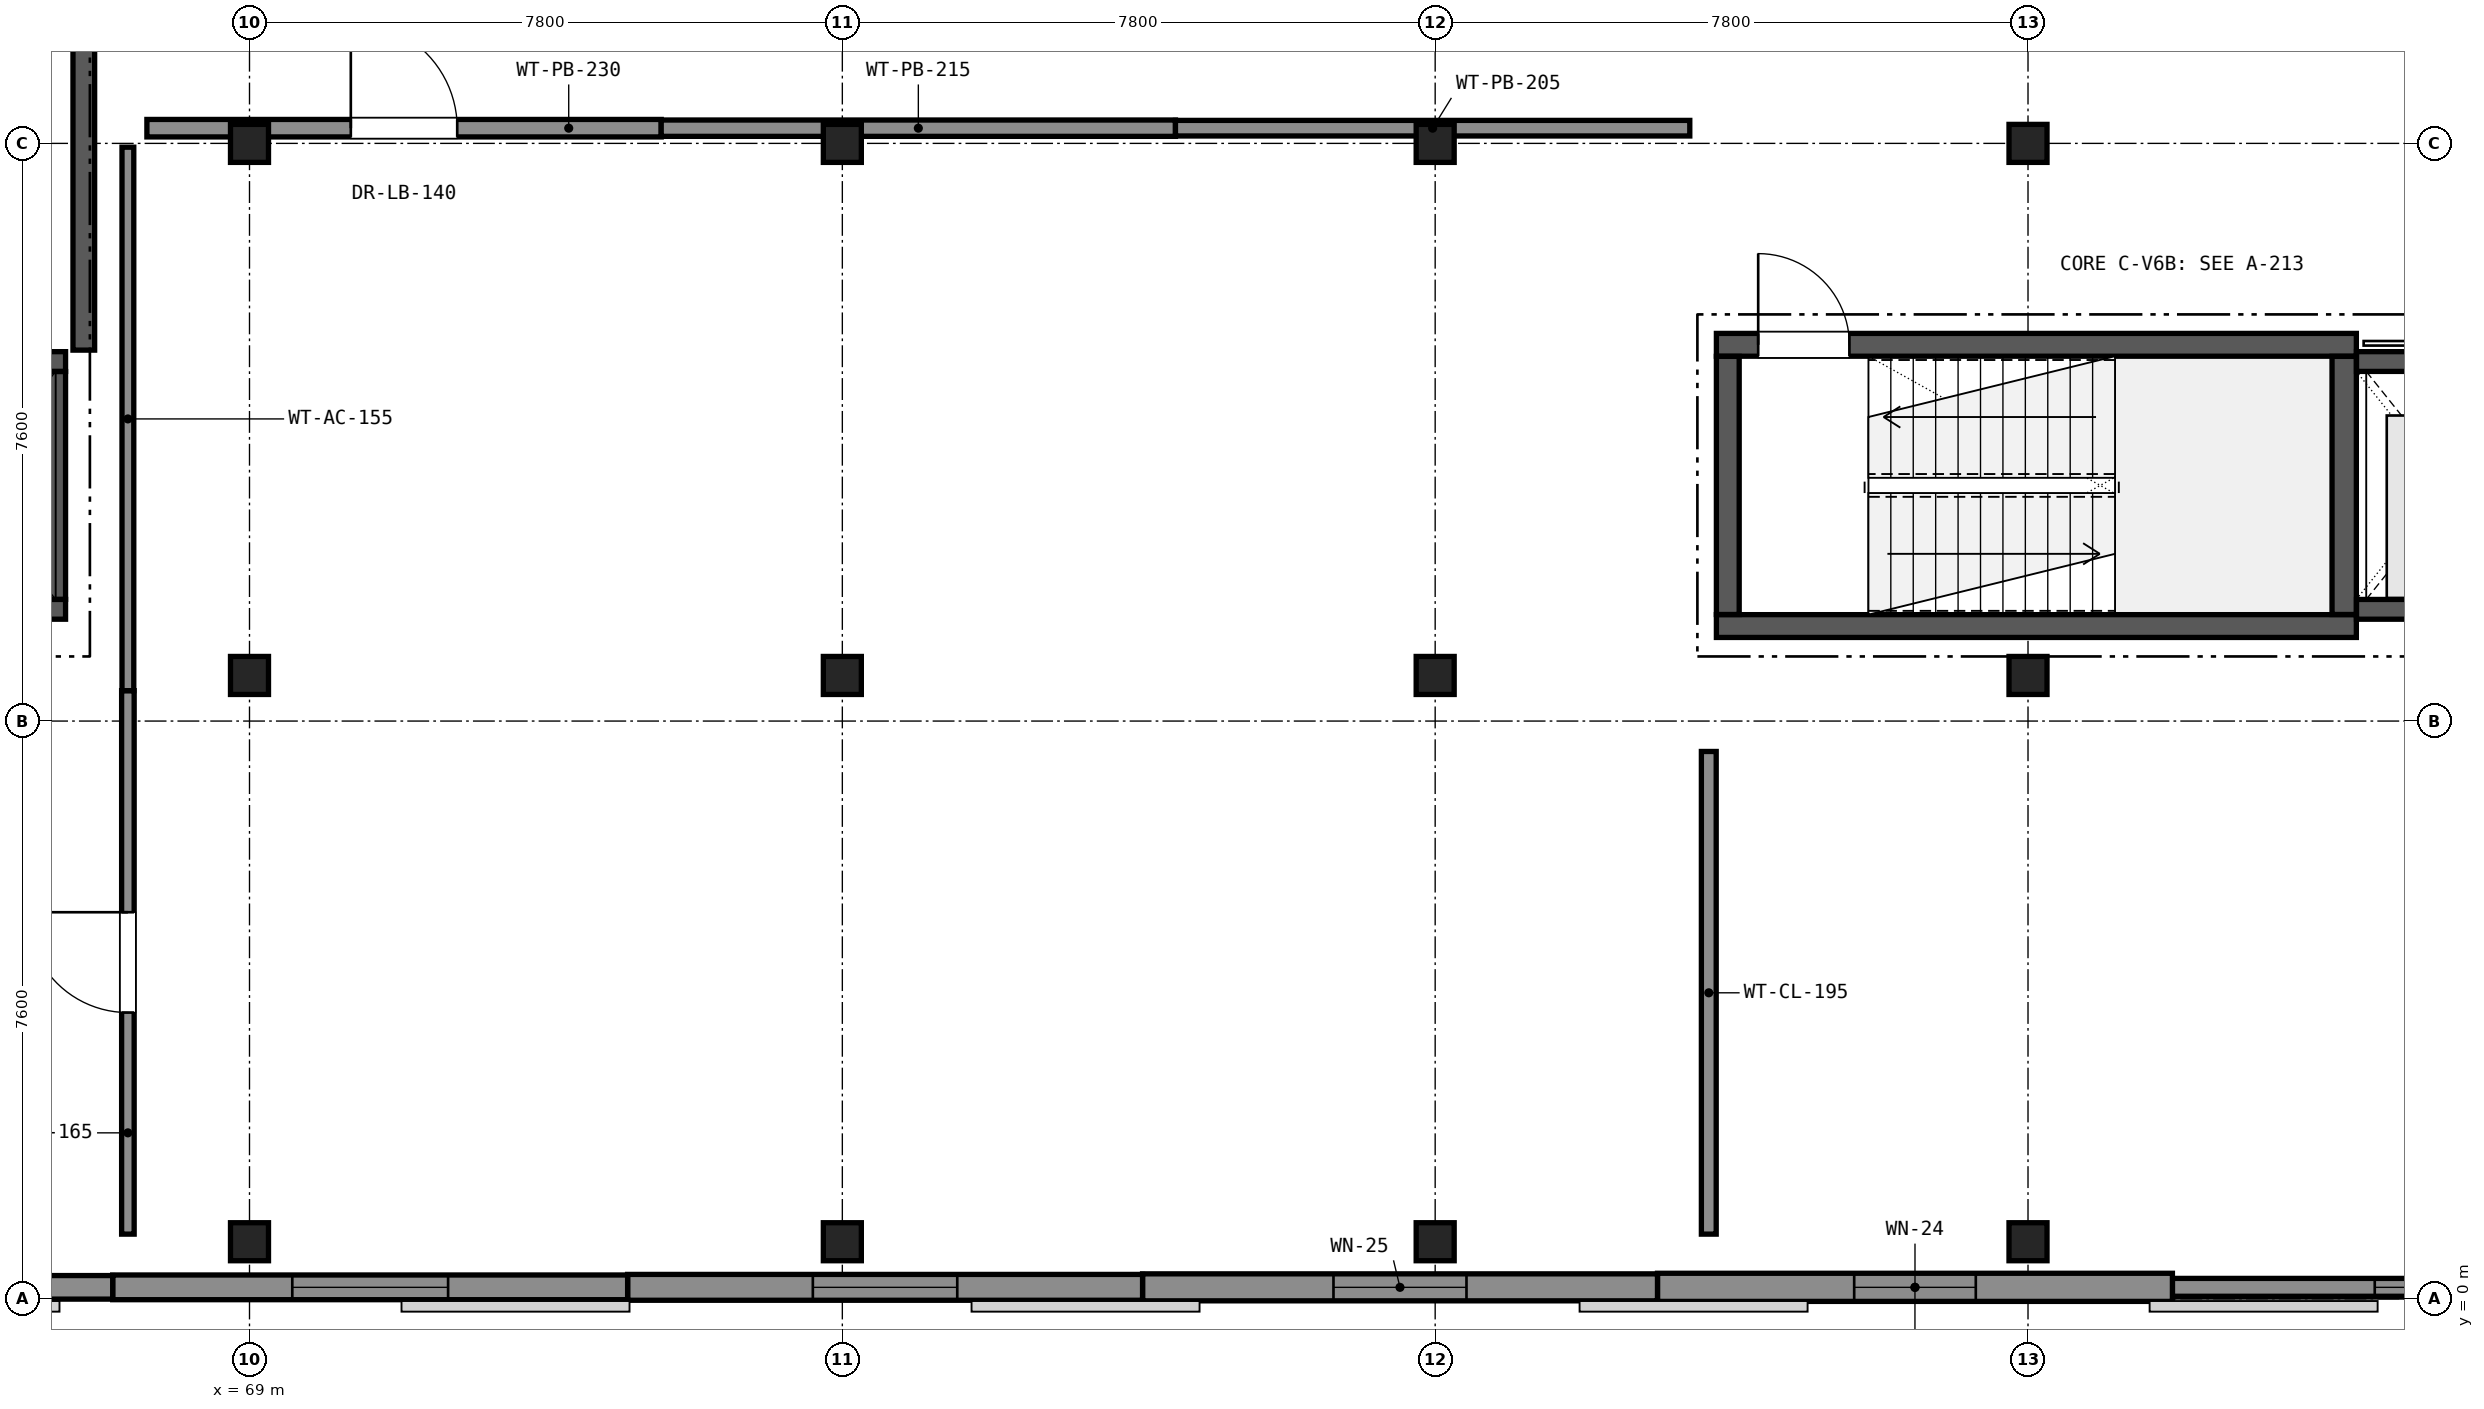
"""IFC4 building model, lengths in metres.
Left out: names, types, materials, properties, quantities, classifications, styles, units other than length and angle.
Written with IfcOpenShell. Run it as: python <this file> out.ifc"""

import sys

from ifc_helpers import new_model, si_unit, direction, frame, frame_2d, origin, origin_2d, place, context, subcontext, project, spatial, rectangle, extrude, element, fill, save


model = new_model("IFC4")
c1 = context("Model", 3, precision=1e-05, world=origin(), true_north=direction((0.0, 1.0)))
c2 = subcontext(c1, "Body", "Model", "MODEL_VIEW")
j1 = project(units=[si_unit("LENGTHUNIT", "METRE"), si_unit("PLANEANGLEUNIT", "RADIAN")], contexts=[c1])
p1 = place(None, origin())
s1 = spatial("IfcSite", under=j1, at=p1, CompositionType="ELEMENT")
p2 = place(p1, origin())
s2 = spatial("IfcBuilding", under=s1, at=p2, CompositionType="ELEMENT")
p3 = place(p2, frame((0.0, 0.0, 13.6)))
s3 = spatial("IfcBuildingStorey", under=s2, at=p3, CompositionType="ELEMENT", Elevation=13.6)
for number, where, z_axis, x_axis in (
    (1, (69.0, 0.75, 0.0), (0.0, 0.0, 1.0), (1.0, 0.0, 0.0)),
    (2, (69.0, 8.2, 0.0), (0.0, 0.0, 1.0), (1.0, 0.0, 0.0)),
    (3, (69.0, 15.2, 0.0), (0.0, 0.0, 1.0), (1.0, 0.0, 0.0)),
    (4, (76.8, 0.75, 0.0), (0.0, 0.0, 1.0), (1.0, 0.0, 0.0)),
    (5, (76.8, 8.2, 0.0), (0.0, 0.0, 1.0), (1.0, 0.0, 0.0)),
    (6, (76.8, 15.2, 0.0), (0.0, 0.0, 1.0), (1.0, 0.0, 0.0)),
    (7, (84.6, 0.75, 0.0), (0.0, 0.0, 1.0), (1.0, 0.0, 0.0)),
    (8, (84.6, 8.2, 0.0), (0.0, 0.0, 1.0), (1.0, 0.0, 0.0)),
    (9, (84.6, 15.2, 0.0), (0.0, 0.0, 1.0), (1.0, 0.0, 0.0)),
    (10, (92.4, 0.75, 0.0), (0.0, 0.0, 1.0), (1.0, 0.0, 0.0)),
    (11, (92.4, 8.2, 0.0), (0.0, 0.0, 1.0), (1.0, 0.0, 0.0)),
    (12, (92.4, 15.2, 0.0), (0.0, 0.0, 1.0), (1.0, 0.0, 0.0)),
):
    element("IfcColumn", number, at=place(p3, frame(where, z_axis=z_axis, x_axis=x_axis)), inside=s3, PredefinedType="COLUMN", context=c2, shape_type="SweptSolid", body=[
        extrude(rectangle(XDim=0.5, YDim=0.5, at=origin_2d()), origin(), (0.0, 0.0, 1.0), 4.08),
    ])
p4 = place(p3, frame((101.075, 0.15, 0.0), z_axis=(0.0, 0.0, 1.0), x_axis=(-1.0, 0.0, 0.0)))
e13 = element("IfcWall", 13, at=p4, inside=s3, PredefinedType="SOLIDWALL", context=c2, shape_type="SweptSolid", body=[
    extrude(rectangle(XDim=6.775, YDim=0.235, at=frame_2d((3.387, 0.0))), origin(), (0.0, 0.0, 1.0), 3.78),
])
p5 = place(p4, frame((2.663, 0.0, 0.9)))
e14 = element("IfcOpeningElement", 14, at=p5, cuts=e13, PredefinedType="OPENING", context=c2, shape_type="SweptSolid", body=[
    extrude(rectangle(XDim=1.45, YDim=2.0, at=frame_2d((0.725, 1.0))), frame((0.0, 0.127, 0.0), z_axis=(0.0, -1.0, 0.0), x_axis=(1.0, 0.0, 0.0)), (0.0, 0.0, 1.0), 0.255),
])
p6 = place(p3, frame((94.3, 0.15, 0.0), z_axis=(0.0, 0.0, 1.0), x_axis=(-1.0, 0.0, 0.0)))
e15 = element("IfcWall", 15, at=p6, inside=s3, PredefinedType="SOLIDWALL", context=c2, shape_type="SweptSolid", body=[
    extrude(rectangle(XDim=6.775, YDim=0.37, at=frame_2d((3.388, 0.0))), origin(), (0.0, 0.0, 1.0), 3.78),
])
p7 = place(p6, frame((2.587, 0.0, 0.9)))
e16 = element("IfcOpeningElement", 16, at=p7, cuts=e15, PredefinedType="OPENING", context=c2, shape_type="SweptSolid", body=[
    extrude(rectangle(XDim=1.6, YDim=2.0, at=frame_2d((0.8, 1.0))), frame((0.0, 0.195, 0.0), z_axis=(0.0, -1.0, 0.0), x_axis=(1.0, 0.0, 0.0)), (0.0, 0.0, 1.0), 0.39),
])
p8 = place(p3, frame((87.525, 0.15, 0.0), z_axis=(0.0, 0.0, 1.0), x_axis=(-1.0, 0.0, 0.0)))
e17 = element("IfcWall", 17, at=p8, inside=s3, PredefinedType="SOLIDWALL", context=c2, shape_type="SweptSolid", body=[
    extrude(rectangle(XDim=6.775, YDim=0.355, at=frame_2d((3.387, 0.0))), origin(), (0.0, 0.0, 1.0), 3.78),
])
p9 = place(p8, frame((2.513, 0.0, 0.9)))
e18 = element("IfcOpeningElement", 18, at=p9, cuts=e17, PredefinedType="OPENING", context=c2, shape_type="SweptSolid", body=[
    extrude(rectangle(XDim=1.75, YDim=2.0, at=frame_2d((0.875, 1.0))), frame((0.0, 0.188, 0.0), z_axis=(0.0, -1.0, 0.0), x_axis=(1.0, 0.0, 0.0)), (0.0, 0.0, 1.0), 0.375),
])
p10 = place(p3, frame((80.75, 0.15, 0.0), z_axis=(0.0, 0.0, 1.0), x_axis=(-1.0, 0.0, 0.0)))
e19 = element("IfcWall", 19, at=p10, inside=s3, PredefinedType="SOLIDWALL", context=c2, shape_type="SweptSolid", body=[
    extrude(rectangle(XDim=6.775, YDim=0.34, at=frame_2d((3.387, 0.0))), origin(), (0.0, 0.0, 1.0), 3.78),
])
p11 = place(p10, frame((2.438, 0.0, 0.9)))
e20 = element("IfcOpeningElement", 20, at=p11, cuts=e19, PredefinedType="OPENING", context=c2, shape_type="SweptSolid", body=[
    extrude(rectangle(XDim=1.9, YDim=2.0, at=frame_2d((0.95, 1.0))), frame((0.0, 0.18, 0.0), z_axis=(0.0, -1.0, 0.0), x_axis=(1.0, 0.0, 0.0)), (0.0, 0.0, 1.0), 0.36),
])
p12 = place(p3, frame((73.975, 0.15, 0.0), z_axis=(0.0, 0.0, 1.0), x_axis=(-1.0, 0.0, 0.0)))
e21 = element("IfcWall", 21, at=p12, inside=s3, PredefinedType="SOLIDWALL", context=c2, shape_type="SweptSolid", body=[
    extrude(rectangle(XDim=6.775, YDim=0.325, at=frame_2d((3.388, 0.0))), origin(), (0.0, 0.0, 1.0), 3.78),
])
p13 = place(p12, frame((2.362, 0.0, 0.9)))
e22 = element("IfcOpeningElement", 22, at=p13, cuts=e21, PredefinedType="OPENING", context=c2, shape_type="SweptSolid", body=[
    extrude(rectangle(XDim=2.05, YDim=2.0, at=frame_2d((1.025, 1.0))), frame((0.0, 0.172, 0.0), z_axis=(0.0, -1.0, 0.0), x_axis=(1.0, 0.0, 0.0)), (0.0, 0.0, 1.0), 0.345),
])
p14 = place(p3, frame((67.2, 0.15, 0.0), z_axis=(0.0, 0.0, 1.0), x_axis=(-1.0, 0.0, 0.0)))
e23 = element("IfcWall", 23, at=p14, inside=s3, PredefinedType="SOLIDWALL", context=c2, shape_type="SweptSolid", body=[
    extrude(rectangle(XDim=6.775, YDim=0.31, at=frame_2d((3.387, 0.0))), origin(), (0.0, 0.0, 1.0), 3.78),
])
p15 = place(p14, frame((2.238, 0.0, 0.9)))
e24 = element("IfcOpeningElement", 24, at=p15, cuts=e23, PredefinedType="OPENING", context=c2, shape_type="SweptSolid", body=[
    extrude(rectangle(XDim=2.3, YDim=2.0, at=frame_2d((1.15, 1.0))), frame((0.0, 0.165, 0.0), z_axis=(0.0, -1.0, 0.0), x_axis=(1.0, 0.0, 0.0)), (0.0, 0.0, 1.0), 0.33),
])
p16 = place(p3, frame((63.922, 9.07, 0.0), z_axis=(0.0, 0.0, 1.0), x_axis=(1.0, 0.0, 0.0)))
e25 = element("IfcWall", 25, at=p16, inside=s3, PredefinedType="SHEAR", context=c2, shape_type="SweptSolid", body=[
    extrude(rectangle(XDim=2.658, YDim=0.26, at=frame_2d((1.329, 0.0))), origin(), (0.0, 0.0, 1.0), 3.78),
])
p17 = place(p3, frame((63.922, 12.33, 0.0), z_axis=(0.0, 0.0, 1.0), x_axis=(1.0, 0.0, 0.0)))
e26 = element("IfcWall", 26, at=p17, inside=s3, PredefinedType="SHEAR", context=c2, shape_type="SweptSolid", body=[
    extrude(rectangle(XDim=2.658, YDim=0.26, at=frame_2d((1.329, 0.0))), origin(), (0.0, 0.0, 1.0), 3.78),
])
p18 = place(p17, frame((0.619, 0.0, 0.0)))
e27 = element("IfcOpeningElement", 27, at=p18, cuts=e26, PredefinedType="OPENING", context=c2, shape_type="SweptSolid", body=[
    extrude(rectangle(XDim=1.42, YDim=2.25, at=frame_2d((0.71, 1.125))), frame((0.0, 0.14, 0.0), z_axis=(0.0, -1.0, 0.0), x_axis=(1.0, 0.0, 0.0)), (0.0, 0.0, 1.0), 0.28),
])
p19 = place(p3, frame((66.45, 9.202, 0.0), z_axis=(0.0, 0.0, 1.0), x_axis=(0.0, 1.0, 0.0)))
e28 = element("IfcWall", 28, at=p19, inside=s3, PredefinedType="SHEAR", context=c2, shape_type="SweptSolid", body=[
    extrude(rectangle(XDim=2.996, YDim=0.26, at=frame_2d((1.498, 0.0))), origin(), (0.0, 0.0, 1.0), 3.78),
])
p20 = place(p3, frame((66.82, 12.48, 0.0), z_axis=(0.0, 0.0, 1.0), x_axis=(0.0, 1.0, 0.0)))
e29 = element("IfcWall", 29, at=p20, inside=s3, PredefinedType="SHEAR", context=c2, shape_type="SweptSolid", body=[
    extrude(rectangle(XDim=4.03, YDim=0.285, at=frame_2d((2.015, 0.0))), origin(), (0.0, 0.0, 1.0), 3.03),
])
p21 = place(p3, frame((88.3, 8.85, 0.0), z_axis=(0.0, 0.0, 1.0), x_axis=(1.0, 0.0, 0.0)))
e30 = element("IfcWall", 30, at=p21, inside=s3, PredefinedType="SHEAR", context=c2, shape_type="SweptSolid", body=[
    extrude(rectangle(XDim=8.42, YDim=0.3, at=frame_2d((4.21, 0.0))), origin(), (0.0, 0.0, 1.0), 3.78),
])
p22 = place(p3, frame((88.3, 12.55, 0.0), z_axis=(0.0, 0.0, 1.0), x_axis=(1.0, 0.0, 0.0)))
e31 = element("IfcWall", 31, at=p22, inside=s3, PredefinedType="SHEAR", context=c2, shape_type="SweptSolid", body=[
    extrude(rectangle(XDim=8.42, YDim=0.3, at=frame_2d((4.21, 0.0))), origin(), (0.0, 0.0, 1.0), 3.78),
])
p23 = place(p22, frame((0.55, 0.0, 0.0)))
e32 = element("IfcOpeningElement", 32, at=p23, cuts=e31, PredefinedType="OPENING", context=c2, shape_type="SweptSolid", body=[
    extrude(rectangle(XDim=1.2, YDim=2.2, at=frame_2d((0.6, 1.1))), frame((0.0, 0.16, 0.0), z_axis=(0.0, -1.0, 0.0), x_axis=(1.0, 0.0, 0.0)), (0.0, 0.0, 1.0), 0.32),
])
p24 = place(p3, frame((88.45, 9.002, 0.0), z_axis=(0.0, 0.0, 1.0), x_axis=(0.0, 1.0, 0.0)))
e33 = element("IfcWall", 33, at=p24, inside=s3, PredefinedType="SHEAR", context=c2, shape_type="SweptSolid", body=[
    extrude(rectangle(XDim=3.396, YDim=0.3, at=frame_2d((1.698, 0.0))), origin(), (0.0, 0.0, 1.0), 3.78),
])
p25 = place(p3, frame((96.56, 9.002, 0.0), z_axis=(0.0, 0.0, 1.0), x_axis=(0.0, 1.0, 0.0)))
e34 = element("IfcWall", 34, at=p25, inside=s3, PredefinedType="SHEAR", context=c2, shape_type="SweptSolid", body=[
    extrude(rectangle(XDim=3.396, YDim=0.32, at=frame_2d((1.698, 0.0))), origin(), (0.0, 0.0, 1.0), 3.78),
])
p26 = place(p3, frame((96.722, 9.07, 0.0), z_axis=(0.0, 0.0, 1.0), x_axis=(1.0, 0.0, 0.0)))
e35 = element("IfcWall", 35, at=p26, inside=s3, PredefinedType="SHEAR", context=c2, shape_type="SweptSolid", body=[
    extrude(rectangle(XDim=2.658, YDim=0.26, at=frame_2d((1.329, 0.0))), origin(), (0.0, 0.0, 1.0), 3.78),
])
p27 = place(p3, frame((96.722, 12.33, 0.0), z_axis=(0.0, 0.0, 1.0), x_axis=(1.0, 0.0, 0.0)))
e36 = element("IfcWall", 36, at=p27, inside=s3, PredefinedType="SHEAR", context=c2, shape_type="SweptSolid", body=[
    extrude(rectangle(XDim=2.658, YDim=0.26, at=frame_2d((1.329, 0.0))), origin(), (0.0, 0.0, 1.0), 3.78),
])
p28 = place(p27, frame((0.679, 0.0, 0.0)))
e37 = element("IfcOpeningElement", 37, at=p28, cuts=e36, PredefinedType="OPENING", context=c2, shape_type="SweptSolid", body=[
    extrude(rectangle(XDim=1.3, YDim=2.2, at=frame_2d((0.65, 1.1))), frame((0.0, 0.14, 0.0), z_axis=(0.0, -1.0, 0.0), x_axis=(1.0, 0.0, 0.0)), (0.0, 0.0, 1.0), 0.28),
])
p29 = place(p3, frame((67.4, 0.85, 0.0), z_axis=(0.0, 0.0, 1.0), x_axis=(0.0, 1.0, 0.0)))
e38 = element("IfcWall", 38, at=p29, inside=s3, PredefinedType="PARTITIONING", context=c2, shape_type="SweptSolid", body=[
    extrude(rectangle(XDim=7.15, YDim=0.165, at=frame_2d((3.575, 0.0))), origin(), (0.0, 0.0, 1.0), 3.08),
])
p30 = place(p29, frame((2.915, 0.0, 0.0)))
e39 = element("IfcOpeningElement", 39, at=p30, cuts=e38, PredefinedType="OPENING", context=c2, shape_type="SweptSolid", body=[
    extrude(rectangle(XDim=1.32, YDim=2.2, at=frame_2d((0.66, 1.1))), frame((0.0, 0.093, 0.0), z_axis=(0.0, -1.0, 0.0), x_axis=(1.0, 0.0, 0.0)), (0.0, 0.0, 1.0), 0.185),
])
p31 = place(p3, frame((67.4, 8.0, 0.0), z_axis=(0.0, 0.0, 1.0), x_axis=(0.0, 1.0, 0.0)))
e40 = element("IfcWall", 40, at=p31, inside=s3, PredefinedType="PARTITIONING", context=c2, shape_type="SweptSolid", body=[
    extrude(rectangle(XDim=7.15, YDim=0.155, at=frame_2d((3.575, 0.0))), origin(), (0.0, 0.0, 1.0), 3.03),
])
p32 = place(p3, frame((67.65, 15.4, 0.0), z_axis=(0.0, 0.0, 1.0), x_axis=(1.0, 0.0, 0.0)))
e41 = element("IfcWall", 41, at=p32, inside=s3, PredefinedType="PARTITIONING", context=c2, shape_type="SweptSolid", body=[
    extrude(rectangle(XDim=6.767, YDim=0.23, at=frame_2d((3.384, 0.0))), origin(), (0.0, 0.0, 1.0), 2.98),
])
p33 = place(p32, frame((2.683, 0.0, 0.0)))
e42 = element("IfcOpeningElement", 42, at=p33, cuts=e41, PredefinedType="OPENING", context=c2, shape_type="SweptSolid", body=[
    extrude(rectangle(XDim=1.4, YDim=2.2, at=frame_2d((0.7, 1.1))), frame((0.0, 0.125, 0.0), z_axis=(0.0, -1.0, 0.0), x_axis=(1.0, 0.0, 0.0)), (0.0, 0.0, 1.0), 0.25),
])
p34 = place(p3, frame((74.417, 15.4, 0.0), z_axis=(0.0, 0.0, 1.0), x_axis=(1.0, 0.0, 0.0)))
e43 = element("IfcWall", 43, at=p34, inside=s3, PredefinedType="PARTITIONING", context=c2, shape_type="SweptSolid", body=[
    extrude(rectangle(XDim=6.766, YDim=0.215, at=frame_2d((3.383, 0.0))), origin(), (0.0, 0.0, 1.0), 2.98),
])
p35 = place(p3, frame((81.183, 15.4, 0.0), z_axis=(0.0, 0.0, 1.0), x_axis=(1.0, 0.0, 0.0)))
e44 = element("IfcWall", 44, at=p35, inside=s3, PredefinedType="PARTITIONING", context=c2, shape_type="SweptSolid", body=[
    extrude(rectangle(XDim=6.767, YDim=0.205, at=frame_2d((3.383, 0.0))), origin(), (0.0, 0.0, 1.0), 3.13),
])
p36 = place(p3, frame((88.2, 7.2, 0.0), z_axis=(0.0, 0.0, 1.0), x_axis=(0.0, -1.0, 0.0)))
e45 = element("IfcWall", 45, at=p36, inside=s3, PredefinedType="PARTITIONING", context=c2, shape_type="SweptSolid", body=[
    extrude(rectangle(XDim=6.35, YDim=0.195, at=frame_2d((3.175, 0.0))), origin(), (0.0, 0.0, 1.0), 2.98),
])
p37 = place(p5, origin())
e46 = element("IfcWindow", 46, at=p37, inside=s3, PartitioningType="SINGLE_PANEL", PredefinedType="WINDOW", context=c2, shape_type="SweptSolid", body=[
    extrude(rectangle(XDim=1.45, YDim=2.0, at=frame_2d((0.725, 1.0))), frame((0.0, 0.03, 0.0), z_axis=(0.0, -1.0, 0.0), x_axis=(1.0, 0.0, 0.0)), (0.0, 0.0, 1.0), 0.06),
])
fill(e14, e46)
p38 = place(p7, origin())
e47 = element("IfcWindow", 47, at=p38, inside=s3, PartitioningType="SINGLE_PANEL", PredefinedType="WINDOW", context=c2, shape_type="SweptSolid", body=[
    extrude(rectangle(XDim=1.6, YDim=2.0, at=frame_2d((0.8, 1.0))), frame((0.0, 0.03, 0.0), z_axis=(0.0, -1.0, 0.0), x_axis=(1.0, 0.0, 0.0)), (0.0, 0.0, 1.0), 0.06),
])
fill(e16, e47)
p39 = place(p9, origin())
e48 = element("IfcWindow", 48, at=p39, inside=s3, PartitioningType="SINGLE_PANEL", PredefinedType="WINDOW", context=c2, shape_type="SweptSolid", body=[
    extrude(rectangle(XDim=1.75, YDim=2.0, at=frame_2d((0.875, 1.0))), frame((0.0, 0.03, 0.0), z_axis=(0.0, -1.0, 0.0), x_axis=(1.0, 0.0, 0.0)), (0.0, 0.0, 1.0), 0.06),
])
fill(e18, e48)
p40 = place(p11, origin())
e49 = element("IfcWindow", 49, at=p40, inside=s3, PartitioningType="SINGLE_PANEL", PredefinedType="WINDOW", context=c2, shape_type="SweptSolid", body=[
    extrude(rectangle(XDim=1.9, YDim=2.0, at=frame_2d((0.95, 1.0))), frame((0.0, 0.03, 0.0), z_axis=(0.0, -1.0, 0.0), x_axis=(1.0, 0.0, 0.0)), (0.0, 0.0, 1.0), 0.06),
])
fill(e20, e49)
p41 = place(p13, origin())
e50 = element("IfcWindow", 50, at=p41, inside=s3, PartitioningType="SINGLE_PANEL", PredefinedType="WINDOW", context=c2, shape_type="SweptSolid", body=[
    extrude(rectangle(XDim=2.05, YDim=2.0, at=frame_2d((1.025, 1.0))), frame((0.0, 0.03, 0.0), z_axis=(0.0, -1.0, 0.0), x_axis=(1.0, 0.0, 0.0)), (0.0, 0.0, 1.0), 0.06),
])
fill(e22, e50)
p42 = place(p23, origin())
e51 = element("IfcDoor", 51, at=p42, inside=s3, OperationType="SINGLE_SWING_LEFT", PredefinedType="DOOR", context=c2, shape_type="SweptSolid", body=[
    extrude(rectangle(XDim=1.2, YDim=2.2, at=frame_2d((0.6, 1.1))), frame((0.0, 0.025, 0.0), z_axis=(0.0, -1.0, 0.0), x_axis=(1.0, 0.0, 0.0)), (0.0, 0.0, 1.0), 0.05),
])
fill(e32, e51)
p43 = place(p30, origin())
e52 = element("IfcDoor", 52, at=p43, inside=s3, OperationType="SINGLE_SWING_RIGHT", PredefinedType="DOOR", context=c2, shape_type="SweptSolid", body=[
    extrude(rectangle(XDim=1.32, YDim=2.2, at=frame_2d((0.66, 1.1))), frame((0.0, 0.025, 0.0), z_axis=(0.0, -1.0, 0.0), x_axis=(1.0, 0.0, 0.0)), (0.0, 0.0, 1.0), 0.05),
])
fill(e39, e52)
p44 = place(p33, origin())
e53 = element("IfcDoor", 53, at=p44, inside=s3, OperationType="SINGLE_SWING_LEFT", PredefinedType="DOOR", context=c2, shape_type="SweptSolid", body=[
    extrude(rectangle(XDim=1.4, YDim=2.2, at=frame_2d((0.7, 1.1))), frame((0.0, 0.025, 0.0), z_axis=(0.0, -1.0, 0.0), x_axis=(1.0, 0.0, 0.0)), (0.0, 0.0, 1.0), 0.05),
])
fill(e42, e53)
save(model, sys.argv[1])
